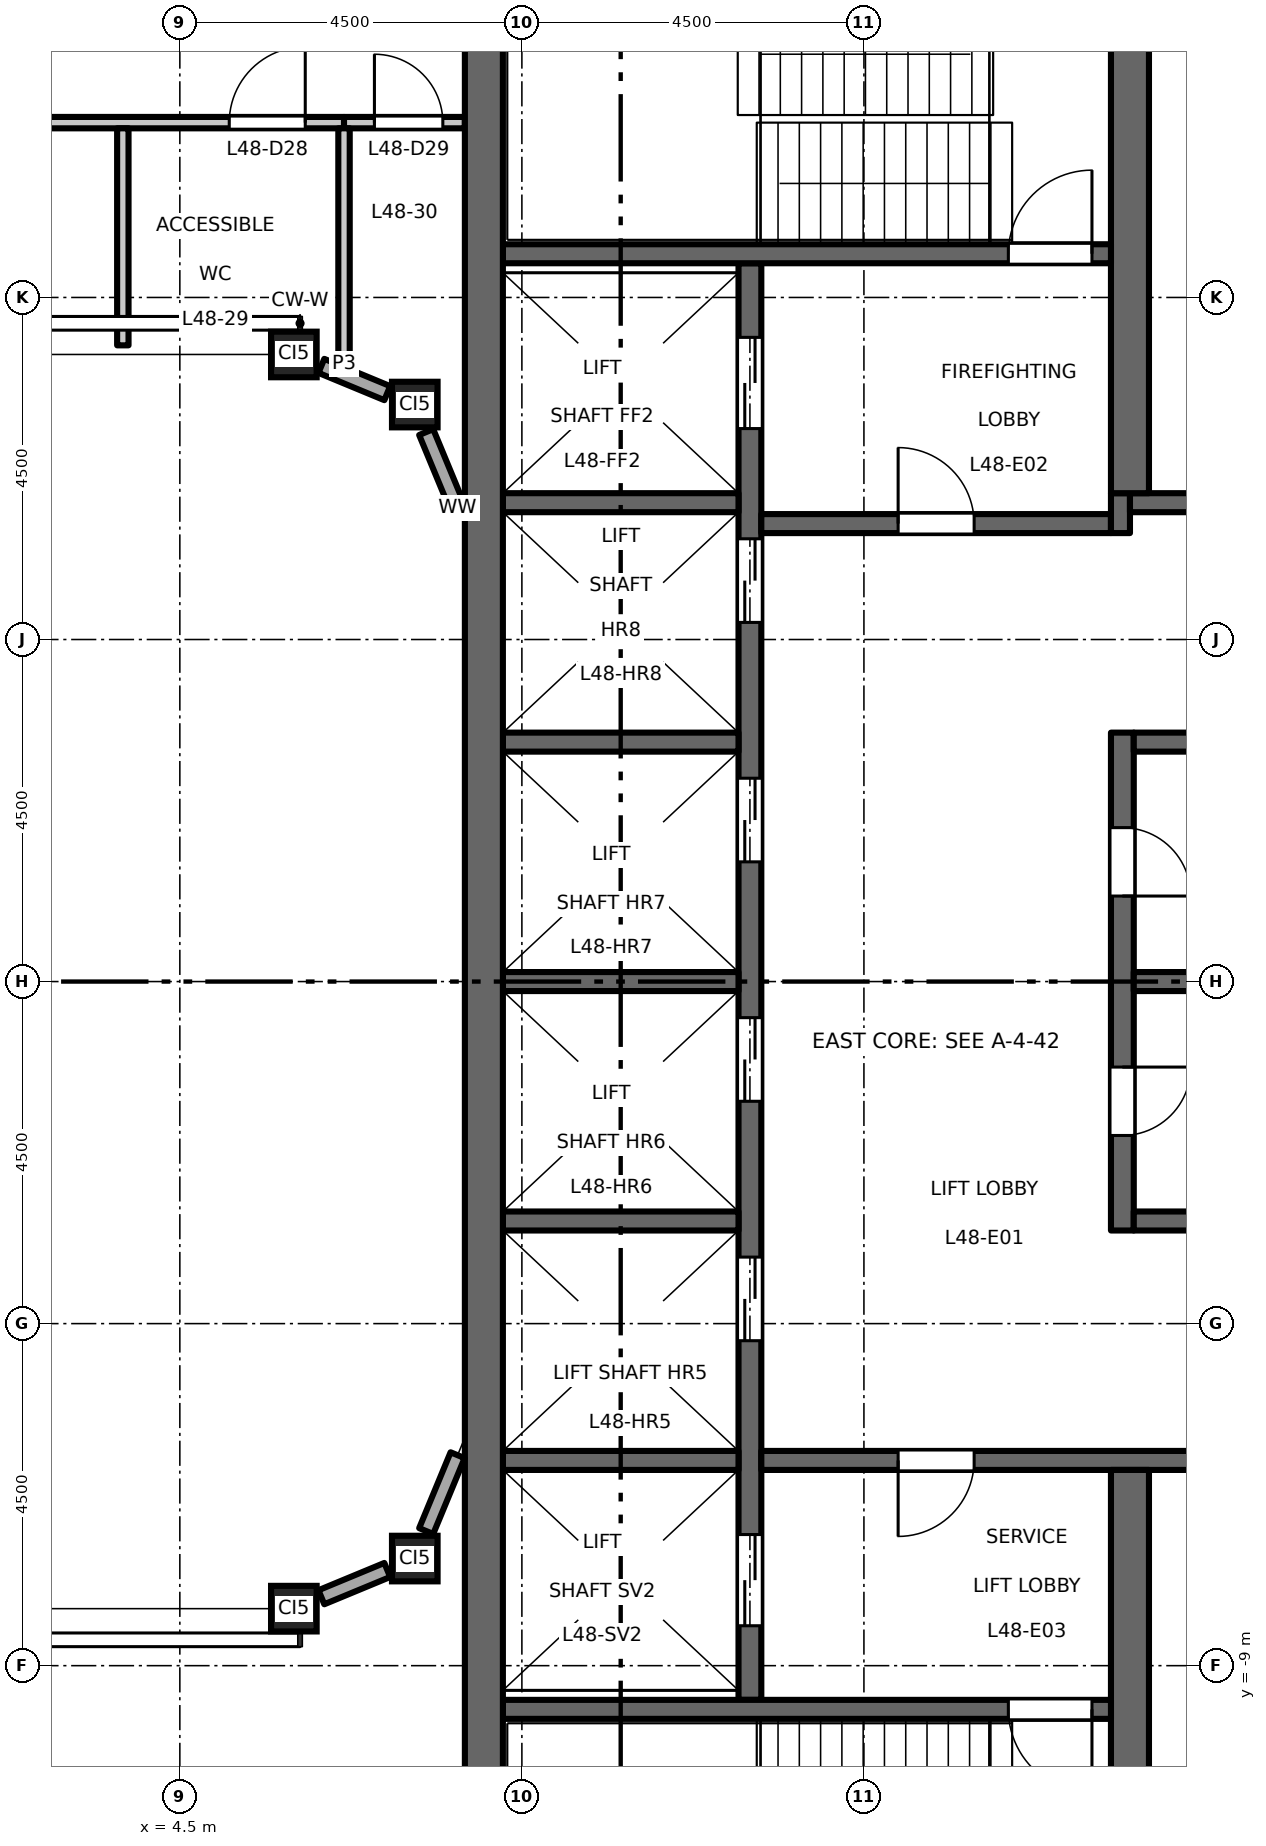
"""IFC4 building model, lengths in metres.
Left out: names, types, materials, properties, quantities, classifications, styles, units other than length and angle.
Written with IfcOpenShell. Run it as: python <this file> out.ifc"""

import sys

from ifc_helpers import new_model, si_unit, direction, frame, frame_2d, origin, origin_2d, place, context, subcontext, project, spatial, rectangle, hollow_rectangle, extrude, element, fill, save


model = new_model("IFC4")
c1 = context("Model", 3, precision=1e-05, world=origin(), true_north=direction((0.0, 1.0)))
c2 = subcontext(c1, "Body", "Model", "MODEL_VIEW")
j1 = project(units=[si_unit("LENGTHUNIT", "METRE"), si_unit("PLANEANGLEUNIT", "RADIAN")], contexts=[c1])
p1 = place(None, origin())
s1 = spatial("IfcSite", under=j1, at=p1, CompositionType="ELEMENT")
p2 = place(p1, origin())
s2 = spatial("IfcBuilding", under=s1, at=p2, CompositionType="ELEMENT")
p3 = place(p2, frame((0.0, 0.0, 224.2)))
s3 = spatial("IfcBuildingStorey", under=s2, at=p3, CompositionType="ELEMENT", Elevation=224.2)
for number, where, z_axis, x_axis in (
    (1, (6.0, -8.25, 0.0), (0.0, 0.0, 1.0), (1.0, 0.0, 0.0)),
    (2, (7.591, -7.591, 0.0), (0.0, 0.0, 1.0), (1.0, 0.0, 0.0)),
    (3, (6.0, 8.25, 0.0), (0.0, 0.0, 1.0), (1.0, 0.0, 0.0)),
    (4, (7.591, 7.591, 0.0), (0.0, 0.0, 1.0), (1.0, 0.0, 0.0)),
):
    element("IfcColumn", number, at=place(p3, frame(where, z_axis=z_axis, x_axis=x_axis)), inside=s3, PredefinedType="COLUMN", context=c2, shape_type="SweptSolid", body=[
        extrude(hollow_rectangle(XDim=0.6, YDim=0.6, WallThickness=0.032, at=origin_2d()), origin(), (0.0, 0.0, 1.0), 4.5),
    ])
p4 = place(p3, frame((12.0, -9.45, 0.0), z_axis=(0.0, 0.0, 1.0), x_axis=(0.0, 1.0, 0.0)))
e5 = element("IfcWall", 5, at=p4, inside=s3, PredefinedType="SHEAR", context=c2, shape_type="SweptSolid", body=[
    extrude(rectangle(XDim=18.9, YDim=0.3, at=frame_2d((9.45, 0.0))), origin(), (0.0, 0.0, 1.0), 4.35),
])
p5 = place(p4, frame((4.725, 0.0, 0.0)))
e6 = element("IfcOpeningElement", 6, at=p5, cuts=e5, PredefinedType="OPENING", context=c2, shape_type="SweptSolid", body=[
    extrude(rectangle(XDim=1.1, YDim=2.1, at=frame_2d((0.55, 1.05))), frame((0.0, 0.16, 0.0), z_axis=(0.0, -1.0, 0.0), x_axis=(1.0, 0.0, 0.0)), (0.0, 0.0, 1.0), 0.32),
])
p6 = place(p4, frame((7.875, 0.0, 0.0)))
e7 = element("IfcOpeningElement", 7, at=p6, cuts=e5, PredefinedType="OPENING", context=c2, shape_type="SweptSolid", body=[
    extrude(rectangle(XDim=1.1, YDim=2.1, at=frame_2d((0.55, 1.05))), frame((0.0, 0.16, 0.0), z_axis=(0.0, -1.0, 0.0), x_axis=(1.0, 0.0, 0.0)), (0.0, 0.0, 1.0), 0.32),
])
p7 = place(p4, frame((11.025, 0.0, 0.0)))
e8 = element("IfcOpeningElement", 8, at=p7, cuts=e5, PredefinedType="OPENING", context=c2, shape_type="SweptSolid", body=[
    extrude(rectangle(XDim=1.1, YDim=2.1, at=frame_2d((0.55, 1.05))), frame((0.0, 0.16, 0.0), z_axis=(0.0, -1.0, 0.0), x_axis=(1.0, 0.0, 0.0)), (0.0, 0.0, 1.0), 0.32),
])
p8 = place(p4, frame((14.175, 0.0, 0.0)))
e9 = element("IfcOpeningElement", 9, at=p8, cuts=e5, PredefinedType="OPENING", context=c2, shape_type="SweptSolid", body=[
    extrude(rectangle(XDim=1.1, YDim=2.1, at=frame_2d((0.55, 1.05))), frame((0.0, 0.16, 0.0), z_axis=(0.0, -1.0, 0.0), x_axis=(1.0, 0.0, 0.0)), (0.0, 0.0, 1.0), 0.32),
])
p9 = place(p4, frame((16.725, 0.0, 0.0)))
e10 = element("IfcOpeningElement", 10, at=p9, cuts=e5, PredefinedType="OPENING", context=c2, shape_type="SweptSolid", body=[
    extrude(rectangle(XDim=1.2, YDim=2.1, at=frame_2d((0.6, 1.05))), frame((0.0, 0.16, 0.0), z_axis=(0.0, -1.0, 0.0), x_axis=(1.0, 0.0, 0.0)), (0.0, 0.0, 1.0), 0.32),
])
p10 = place(p4, frame((0.975, 0.0, 0.0)))
e11 = element("IfcOpeningElement", 11, at=p10, cuts=e5, PredefinedType="OPENING", context=c2, shape_type="SweptSolid", body=[
    extrude(rectangle(XDim=1.2, YDim=2.1, at=frame_2d((0.6, 1.05))), frame((0.0, 0.16, 0.0), z_axis=(0.0, -1.0, 0.0), x_axis=(1.0, 0.0, 0.0)), (0.0, 0.0, 1.0), 0.32),
])
p11 = place(p3, frame((12.15, 6.025, 0.0), z_axis=(0.0, 0.0, 1.0), x_axis=(1.0, 0.0, 0.0)))
e12 = element("IfcWall", 12, at=p11, inside=s3, PredefinedType="SHEAR", context=c2, shape_type="SweptSolid", body=[
    extrude(rectangle(XDim=4.6, YDim=0.25, at=frame_2d((2.3, 0.0))), origin(), (0.0, 0.0, 1.0), 4.35),
])
p12 = place(p11, frame((1.8, 0.0, 0.0)))
e13 = element("IfcOpeningElement", 13, at=p12, cuts=e12, PredefinedType="OPENING", context=c2, shape_type="SweptSolid", body=[
    extrude(rectangle(XDim=1.0, YDim=2.1, at=frame_2d((0.5, 1.05))), frame((0.0, 0.135, 0.0), z_axis=(0.0, -1.0, 0.0), x_axis=(1.0, 0.0, 0.0)), (0.0, 0.0, 1.0), 0.27),
])
p13 = place(p3, frame((16.875, 5.9, 0.0), z_axis=(0.0, 0.0, 1.0), x_axis=(0.0, 1.0, 0.0)))
e14 = element("IfcWall", 14, at=p13, inside=s3, PredefinedType="SHEAR", context=c2, shape_type="SweptSolid", body=[
    extrude(rectangle(XDim=0.525, YDim=0.25, at=frame_2d((0.263, 0.0))), origin(), (0.0, 0.0, 1.0), 4.35),
])
p14 = place(p3, frame((17.0, 6.3, 0.0), z_axis=(0.0, 0.0, 1.0), x_axis=(1.0, 0.0, 0.0)))
e15 = element("IfcWall", 15, at=p14, inside=s3, PredefinedType="SHEAR", context=c2, shape_type="SweptSolid", body=[
    extrude(rectangle(XDim=4.25, YDim=0.25, at=frame_2d((2.125, 0.0))), origin(), (0.0, 0.0, 1.0), 4.35),
])
p15 = place(p3, frame((12.15, -6.3, 0.0), z_axis=(0.0, 0.0, 1.0), x_axis=(1.0, 0.0, 0.0)))
e16 = element("IfcWall", 16, at=p15, inside=s3, PredefinedType="SHEAR", context=c2, shape_type="SweptSolid", body=[
    extrude(rectangle(XDim=9.1, YDim=0.25, at=frame_2d((4.55, 0.0))), origin(), (0.0, 0.0, 1.0), 4.35),
])
p16 = place(p15, frame((1.8, 0.0, 0.0)))
e17 = element("IfcOpeningElement", 17, at=p16, cuts=e16, PredefinedType="OPENING", context=c2, shape_type="SweptSolid", body=[
    extrude(rectangle(XDim=1.0, YDim=2.1, at=frame_2d((0.5, 1.05))), frame((0.0, 0.135, 0.0), z_axis=(0.0, -1.0, 0.0), x_axis=(1.0, 0.0, 0.0)), (0.0, 0.0, 1.0), 0.27),
])
p17 = place(p3, frame((16.9, -3.275, 0.0), z_axis=(0.0, 0.0, 1.0), x_axis=(0.0, 1.0, 0.0)))
e18 = element("IfcWall", 18, at=p17, inside=s3, PredefinedType="SHEAR", context=c2, shape_type="SweptSolid", body=[
    extrude(rectangle(XDim=6.55, YDim=0.3, at=frame_2d((3.275, 0.0))), origin(), (0.0, 0.0, 1.0), 4.35),
])
p18 = place(p17, frame((1.25, 0.0, 0.0)))
e19 = element("IfcOpeningElement", 19, at=p18, cuts=e18, PredefinedType="OPENING", context=c2, shape_type="SweptSolid", body=[
    extrude(rectangle(XDim=0.9, YDim=2.1, at=frame_2d((0.45, 1.05))), frame((0.0, 0.16, 0.0), z_axis=(0.0, -1.0, 0.0), x_axis=(1.0, 0.0, 0.0)), (0.0, 0.0, 1.0), 0.32),
])
p19 = place(p17, frame((4.4, 0.0, 0.0)))
e20 = element("IfcOpeningElement", 20, at=p19, cuts=e18, PredefinedType="OPENING", context=c2, shape_type="SweptSolid", body=[
    extrude(rectangle(XDim=0.9, YDim=2.1, at=frame_2d((0.45, 1.05))), frame((0.0, 0.16, 0.0), z_axis=(0.0, -1.0, 0.0), x_axis=(1.0, 0.0, 0.0)), (0.0, 0.0, 1.0), 0.32),
])
for number, where, z_axis, x_axis in (
    (21, (17.05, 0.0, 0.0), (0.0, 0.0, 1.0), (1.0, 0.0, 0.0)),
    (22, (17.05, 3.15, 0.0), (0.0, 0.0, 1.0), (1.0, 0.0, 0.0)),
    (23, (17.05, -3.15, 0.0), (0.0, 0.0, 1.0), (1.0, 0.0, 0.0)),
):
    element("IfcWall", number, at=place(p3, frame(where, z_axis=z_axis, x_axis=x_axis)), inside=s3, PredefinedType="SHEAR", context=c2, shape_type="SweptSolid", body=[
        extrude(rectangle(XDim=4.2, YDim=0.25, at=frame_2d((2.1, 0.0))), origin(), (0.0, 0.0, 1.0), 4.35),
    ])
for number, where, z_axis, x_axis in (
    (24, (17.0, 6.425, 0.0), (0.0, 0.0, 1.0), (0.0, 1.0, 0.0)),
    (25, (17.0, -13.0, 0.0), (0.0, 0.0, 1.0), (0.0, 1.0, 0.0)),
):
    element("IfcWall", number, at=place(p3, frame(where, z_axis=z_axis, x_axis=x_axis)), inside=s3, PredefinedType="SHEAR", context=c2, shape_type="SweptSolid", body=[
        extrude(rectangle(XDim=6.575, YDim=0.5, at=frame_2d((3.288, 0.0))), origin(), (0.0, 0.0, 1.0), 4.35),
    ])
for number, where, z_axis, x_axis in (
    (26, (8.75, 0.0, 0.0), (0.0, 0.0, 1.0), (1.0, 0.0, 0.0)),
    (27, (8.75, 3.15, 0.0), (0.0, 0.0, 1.0), (1.0, 0.0, 0.0)),
    (28, (8.75, 6.3, 0.0), (0.0, 0.0, 1.0), (1.0, 0.0, 0.0)),
    (29, (8.75, -3.15, 0.0), (0.0, 0.0, 1.0), (1.0, 0.0, 0.0)),
    (30, (8.75, -6.3, 0.0), (0.0, 0.0, 1.0), (1.0, 0.0, 0.0)),
):
    element("IfcWall", number, at=place(p3, frame(where, z_axis=z_axis, x_axis=x_axis)), inside=s3, PredefinedType="SHEAR", context=c2, shape_type="SweptSolid", body=[
        extrude(rectangle(XDim=3.1, YDim=0.25, at=frame_2d((1.55, 0.0))), origin(), (0.0, 0.0, 1.0), 4.35),
    ])
p20 = place(p3, frame((8.75, 9.575, 0.0), z_axis=(0.0, 0.0, 1.0), x_axis=(1.0, 0.0, 0.0)))
e31 = element("IfcWall", 31, at=p20, inside=s3, PredefinedType="SHEAR", context=c2, shape_type="SweptSolid", body=[
    extrude(rectangle(XDim=8.0, YDim=0.25, at=frame_2d((4.0, 0.0))), origin(), (0.0, 0.0, 1.0), 4.35),
])
p21 = place(p20, frame((6.65, 0.0, 0.0)))
e32 = element("IfcOpeningElement", 32, at=p21, cuts=e31, PredefinedType="OPENING", context=c2, shape_type="SweptSolid", body=[
    extrude(rectangle(XDim=1.1, YDim=2.1, at=frame_2d((0.55, 1.05))), frame((0.0, 0.135, 0.0), z_axis=(0.0, -1.0, 0.0), x_axis=(1.0, 0.0, 0.0)), (0.0, 0.0, 1.0), 0.27),
])
p22 = place(p3, frame((8.75, -9.575, 0.0), z_axis=(0.0, 0.0, 1.0), x_axis=(1.0, 0.0, 0.0)))
e33 = element("IfcWall", 33, at=p22, inside=s3, PredefinedType="SHEAR", context=c2, shape_type="SweptSolid", body=[
    extrude(rectangle(XDim=8.0, YDim=0.25, at=frame_2d((4.0, 0.0))), origin(), (0.0, 0.0, 1.0), 4.35),
])
p23 = place(p22, frame((6.65, 0.0, 0.0)))
e34 = element("IfcOpeningElement", 34, at=p23, cuts=e33, PredefinedType="OPENING", context=c2, shape_type="SweptSolid", body=[
    extrude(rectangle(XDim=1.1, YDim=2.1, at=frame_2d((0.55, 1.05))), frame((0.0, 0.135, 0.0), z_axis=(0.0, -1.0, 0.0), x_axis=(1.0, 0.0, 0.0)), (0.0, 0.0, 1.0), 0.27),
])
p24 = place(p3, frame((8.5, -13.0, 0.0), z_axis=(0.0, 0.0, 1.0), x_axis=(0.0, 1.0, 0.0)))
e35 = element("IfcWall", 35, at=p24, inside=s3, PredefinedType="SHEAR", context=c2, shape_type="SweptSolid", body=[
    extrude(rectangle(XDim=26.0, YDim=0.5, at=frame_2d((13.0, 0.0))), origin(), (0.0, 0.0, 1.0), 4.35),
])
p25 = place(p3, frame((6.362, -8.1, 0.0), z_axis=(0.0, 0.0, 1.0), x_axis=(0.923829670615, 0.382803787458, 0.0)))
e36 = element("IfcWall", 36, at=p25, inside=s3, PredefinedType="STANDARD", context=c2, shape_type="SweptSolid", body=[
    extrude(rectangle(XDim=0.938, YDim=0.2, at=frame_2d((0.469, 0.0))), origin(), (0.0, 0.0, 1.0), 3.918),
])
for number, where, z_axis, x_axis in (
    (37, (7.741, -7.229, 0.0), (0.0, 0.0, 1.0), (0.383, 0.924, 0.0)),
    (38, (8.154, 6.231, 0.0), (0.0, 0.0, 1.0), (-0.383, 0.924, 0.0)),
):
    element("IfcWall", number, at=place(p3, frame(where, z_axis=z_axis, x_axis=x_axis)), inside=s3, PredefinedType="STANDARD", context=c2, shape_type="SweptSolid", body=[
        extrude(rectangle(XDim=1.08, YDim=0.2, at=frame_2d((0.54, 0.0))), origin(), (0.0, 0.0, 1.0), 3.918),
    ])
p26 = place(p3, frame((7.229, 7.741, 0.0), z_axis=(0.0, 0.0, 1.0), x_axis=(-0.923829670615, 0.382803787458, 0.0)))
e39 = element("IfcWall", 39, at=p26, inside=s3, PredefinedType="STANDARD", context=c2, shape_type="SweptSolid", body=[
    extrude(rectangle(XDim=0.938, YDim=0.2, at=frame_2d((0.469, 0.0))), origin(), (0.0, 0.0, 1.0), 3.918),
])
p27 = place(p3, frame((-8.25, 11.3, 0.0), z_axis=(0.0, 0.0, 1.0), x_axis=(1.0, 0.0, 0.0)))
e40 = element("IfcWall", 40, at=p27, inside=s3, PredefinedType="PARTITIONING", context=c2, shape_type="SweptSolid", body=[
    extrude(rectangle(XDim=14.91, YDim=0.15, at=frame_2d((7.455, 0.0))), origin(), (0.0, 0.0, 1.0), 4.35),
])
p28 = place(p27, frame((4.4, 0.0, 0.0)))
e41 = element("IfcOpeningElement", 41, at=p28, cuts=e40, PredefinedType="OPENING", context=c2, shape_type="SweptSolid", body=[
    extrude(rectangle(XDim=1.0, YDim=2.1, at=frame_2d((0.5, 1.05))), frame((0.0, 0.085, 0.0), z_axis=(0.0, -1.0, 0.0), x_axis=(1.0, 0.0, 0.0)), (0.0, 0.0, 1.0), 0.17),
])
p29 = place(p27, frame((6.65, 0.0, 0.0)))
e42 = element("IfcOpeningElement", 42, at=p29, cuts=e40, PredefinedType="OPENING", context=c2, shape_type="SweptSolid", body=[
    extrude(rectangle(XDim=1.0, YDim=2.1, at=frame_2d((0.5, 1.05))), frame((0.0, 0.085, 0.0), z_axis=(0.0, -1.0, 0.0), x_axis=(1.0, 0.0, 0.0)), (0.0, 0.0, 1.0), 0.17),
])
p30 = place(p27, frame((13.4, 0.0, 0.0)))
e43 = element("IfcOpeningElement", 43, at=p30, cuts=e40, PredefinedType="OPENING", context=c2, shape_type="SweptSolid", body=[
    extrude(rectangle(XDim=1.0, YDim=2.1, at=frame_2d((0.5, 1.05))), frame((0.0, 0.085, 0.0), z_axis=(0.0, -1.0, 0.0), x_axis=(1.0, 0.0, 0.0)), (0.0, 0.0, 1.0), 0.17),
])
p31 = place(p3, frame((6.66, 11.3, 0.0), z_axis=(0.0, 0.0, 1.0), x_axis=(1.0, 0.0, 0.0)))
e44 = element("IfcWall", 44, at=p31, inside=s3, PredefinedType="PARTITIONING", context=c2, shape_type="SweptSolid", body=[
    extrude(rectangle(XDim=1.59, YDim=0.15, at=frame_2d((0.795, 0.0))), origin(), (0.0, 0.0, 1.0), 4.35),
])
p32 = place(p31, frame((0.4, 0.0, 0.0)))
e45 = element("IfcOpeningElement", 45, at=p32, cuts=e44, PredefinedType="OPENING", context=c2, shape_type="SweptSolid", body=[
    extrude(rectangle(XDim=0.9, YDim=2.1, at=frame_2d((0.45, 1.05))), frame((0.0, 0.085, 0.0), z_axis=(0.0, -1.0, 0.0), x_axis=(1.0, 0.0, 0.0)), (0.0, 0.0, 1.0), 0.17),
])
p33 = place(p3, frame((3.75, 8.37, 0.0), z_axis=(0.0, 0.0, 1.0), x_axis=(0.0, 1.0, 0.0)))
e46 = element("IfcWall", 46, at=p33, inside=s3, PredefinedType="PARTITIONING", context=c2, shape_type="SweptSolid", body=[
    extrude(rectangle(XDim=2.855, YDim=0.15, at=frame_2d((1.427, 0.0))), origin(), (0.0, 0.0, 1.0), 4.35),
])
p34 = place(p3, frame((6.66, 8.127, 0.0), z_axis=(0.0, 0.0, 1.0), x_axis=(0.0, 1.0, 0.0)))
e47 = element("IfcWall", 47, at=p34, inside=s3, PredefinedType="PARTITIONING", context=c2, shape_type="SweptSolid", body=[
    extrude(rectangle(XDim=3.098, YDim=0.15, at=frame_2d((1.549, 0.0))), origin(), (0.0, 0.0, 1.0), 4.35),
])
p35 = place(p12, origin())
e48 = element("IfcDoor", 48, at=p35, inside=s3, OperationType="SINGLE_SWING_RIGHT", PredefinedType="DOOR", context=c2, shape_type="SweptSolid", body=[
    extrude(rectangle(XDim=1.0, YDim=2.1, at=frame_2d((0.5, 1.05))), frame((0.0, 0.025, 0.0), z_axis=(0.0, -1.0, 0.0), x_axis=(1.0, 0.0, 0.0)), (0.0, 0.0, 1.0), 0.05),
])
fill(e13, e48)
p36 = place(p16, origin())
e49 = element("IfcDoor", 49, at=p36, inside=s3, OperationType="SINGLE_SWING_LEFT", PredefinedType="DOOR", context=c2, shape_type="SweptSolid", body=[
    extrude(rectangle(XDim=1.0, YDim=2.1, at=frame_2d((0.5, 1.05))), frame((0.0, 0.025, 0.0), z_axis=(0.0, -1.0, 0.0), x_axis=(1.0, 0.0, 0.0)), (0.0, 0.0, 1.0), 0.05),
])
fill(e17, e49)
p37 = place(p21, origin())
e50 = element("IfcDoor", 50, at=p37, inside=s3, OperationType="SINGLE_SWING_LEFT", PredefinedType="DOOR", context=c2, shape_type="SweptSolid", body=[
    extrude(rectangle(XDim=1.1, YDim=2.1, at=frame_2d((0.55, 1.05))), frame((0.0, 0.025, 0.0), z_axis=(0.0, -1.0, 0.0), x_axis=(1.0, 0.0, 0.0)), (0.0, 0.0, 1.0), 0.05),
])
fill(e32, e50)
p38 = place(p23, origin())
e51 = element("IfcDoor", 51, at=p38, inside=s3, OperationType="SINGLE_SWING_RIGHT", PredefinedType="DOOR", context=c2, shape_type="SweptSolid", body=[
    extrude(rectangle(XDim=1.1, YDim=2.1, at=frame_2d((0.55, 1.05))), frame((0.0, 0.025, 0.0), z_axis=(0.0, -1.0, 0.0), x_axis=(1.0, 0.0, 0.0)), (0.0, 0.0, 1.0), 0.05),
])
fill(e34, e51)
p39 = place(p5, origin())
e52 = element("IfcDoor", 52, at=p39, inside=s3, OperationType="DOUBLE_DOOR_SLIDING", PredefinedType="DOOR", context=c2, shape_type="SweptSolid", body=[
    extrude(rectangle(XDim=1.1, YDim=2.1, at=frame_2d((0.55, 1.05))), frame((0.0, 0.025, 0.0), z_axis=(0.0, -1.0, 0.0), x_axis=(1.0, 0.0, 0.0)), (0.0, 0.0, 1.0), 0.05),
])
fill(e6, e52)
p40 = place(p6, origin())
e53 = element("IfcDoor", 53, at=p40, inside=s3, OperationType="DOUBLE_DOOR_SLIDING", PredefinedType="DOOR", context=c2, shape_type="SweptSolid", body=[
    extrude(rectangle(XDim=1.1, YDim=2.1, at=frame_2d((0.55, 1.05))), frame((0.0, 0.025, 0.0), z_axis=(0.0, -1.0, 0.0), x_axis=(1.0, 0.0, 0.0)), (0.0, 0.0, 1.0), 0.05),
])
fill(e7, e53)
p41 = place(p7, origin())
e54 = element("IfcDoor", 54, at=p41, inside=s3, OperationType="DOUBLE_DOOR_SLIDING", PredefinedType="DOOR", context=c2, shape_type="SweptSolid", body=[
    extrude(rectangle(XDim=1.1, YDim=2.1, at=frame_2d((0.55, 1.05))), frame((0.0, 0.025, 0.0), z_axis=(0.0, -1.0, 0.0), x_axis=(1.0, 0.0, 0.0)), (0.0, 0.0, 1.0), 0.05),
])
fill(e8, e54)
p42 = place(p8, origin())
e55 = element("IfcDoor", 55, at=p42, inside=s3, OperationType="DOUBLE_DOOR_SLIDING", PredefinedType="DOOR", context=c2, shape_type="SweptSolid", body=[
    extrude(rectangle(XDim=1.1, YDim=2.1, at=frame_2d((0.55, 1.05))), frame((0.0, 0.025, 0.0), z_axis=(0.0, -1.0, 0.0), x_axis=(1.0, 0.0, 0.0)), (0.0, 0.0, 1.0), 0.05),
])
fill(e9, e55)
p43 = place(p9, origin())
e56 = element("IfcDoor", 56, at=p43, inside=s3, OperationType="DOUBLE_DOOR_SLIDING", PredefinedType="DOOR", context=c2, shape_type="SweptSolid", body=[
    extrude(rectangle(XDim=1.2, YDim=2.1, at=frame_2d((0.6, 1.05))), frame((0.0, 0.025, 0.0), z_axis=(0.0, -1.0, 0.0), x_axis=(1.0, 0.0, 0.0)), (0.0, 0.0, 1.0), 0.05),
])
fill(e10, e56)
p44 = place(p10, origin())
e57 = element("IfcDoor", 57, at=p44, inside=s3, OperationType="DOUBLE_DOOR_SLIDING", PredefinedType="DOOR", context=c2, shape_type="SweptSolid", body=[
    extrude(rectangle(XDim=1.2, YDim=2.1, at=frame_2d((0.6, 1.05))), frame((0.0, 0.025, 0.0), z_axis=(0.0, -1.0, 0.0), x_axis=(1.0, 0.0, 0.0)), (0.0, 0.0, 1.0), 0.05),
])
fill(e11, e57)
p45 = place(p18, origin())
e58 = element("IfcDoor", 58, at=p45, inside=s3, OperationType="SINGLE_SWING_RIGHT", PredefinedType="DOOR", context=c2, shape_type="SweptSolid", body=[
    extrude(rectangle(XDim=0.9, YDim=2.1, at=frame_2d((0.45, 1.05))), frame((0.0, 0.025, 0.0), z_axis=(0.0, -1.0, 0.0), x_axis=(1.0, 0.0, 0.0)), (0.0, 0.0, 1.0), 0.05),
])
fill(e19, e58)
p46 = place(p19, origin())
e59 = element("IfcDoor", 59, at=p46, inside=s3, OperationType="SINGLE_SWING_LEFT", PredefinedType="DOOR", context=c2, shape_type="SweptSolid", body=[
    extrude(rectangle(XDim=0.9, YDim=2.1, at=frame_2d((0.45, 1.05))), frame((0.0, 0.025, 0.0), z_axis=(0.0, -1.0, 0.0), x_axis=(1.0, 0.0, 0.0)), (0.0, 0.0, 1.0), 0.05),
])
fill(e20, e59)
p47 = place(p30, origin())
e60 = element("IfcDoor", 60, at=p47, inside=s3, OperationType="SINGLE_SWING_RIGHT", PredefinedType="DOOR", context=c2, shape_type="SweptSolid", body=[
    extrude(rectangle(XDim=1.0, YDim=2.1, at=frame_2d((0.5, 1.05))), frame((0.0, 0.025, 0.0), z_axis=(0.0, -1.0, 0.0), x_axis=(1.0, 0.0, 0.0)), (0.0, 0.0, 1.0), 0.05),
])
fill(e43, e60)
p48 = place(p32, origin())
e61 = element("IfcDoor", 61, at=p48, inside=s3, OperationType="SINGLE_SWING_LEFT", PredefinedType="DOOR", context=c2, shape_type="SweptSolid", body=[
    extrude(rectangle(XDim=0.9, YDim=2.1, at=frame_2d((0.45, 1.05))), frame((0.0, 0.025, 0.0), z_axis=(0.0, -1.0, 0.0), x_axis=(1.0, 0.0, 0.0)), (0.0, 0.0, 1.0), 0.05),
])
fill(e45, e61)
save(model, sys.argv[1])
